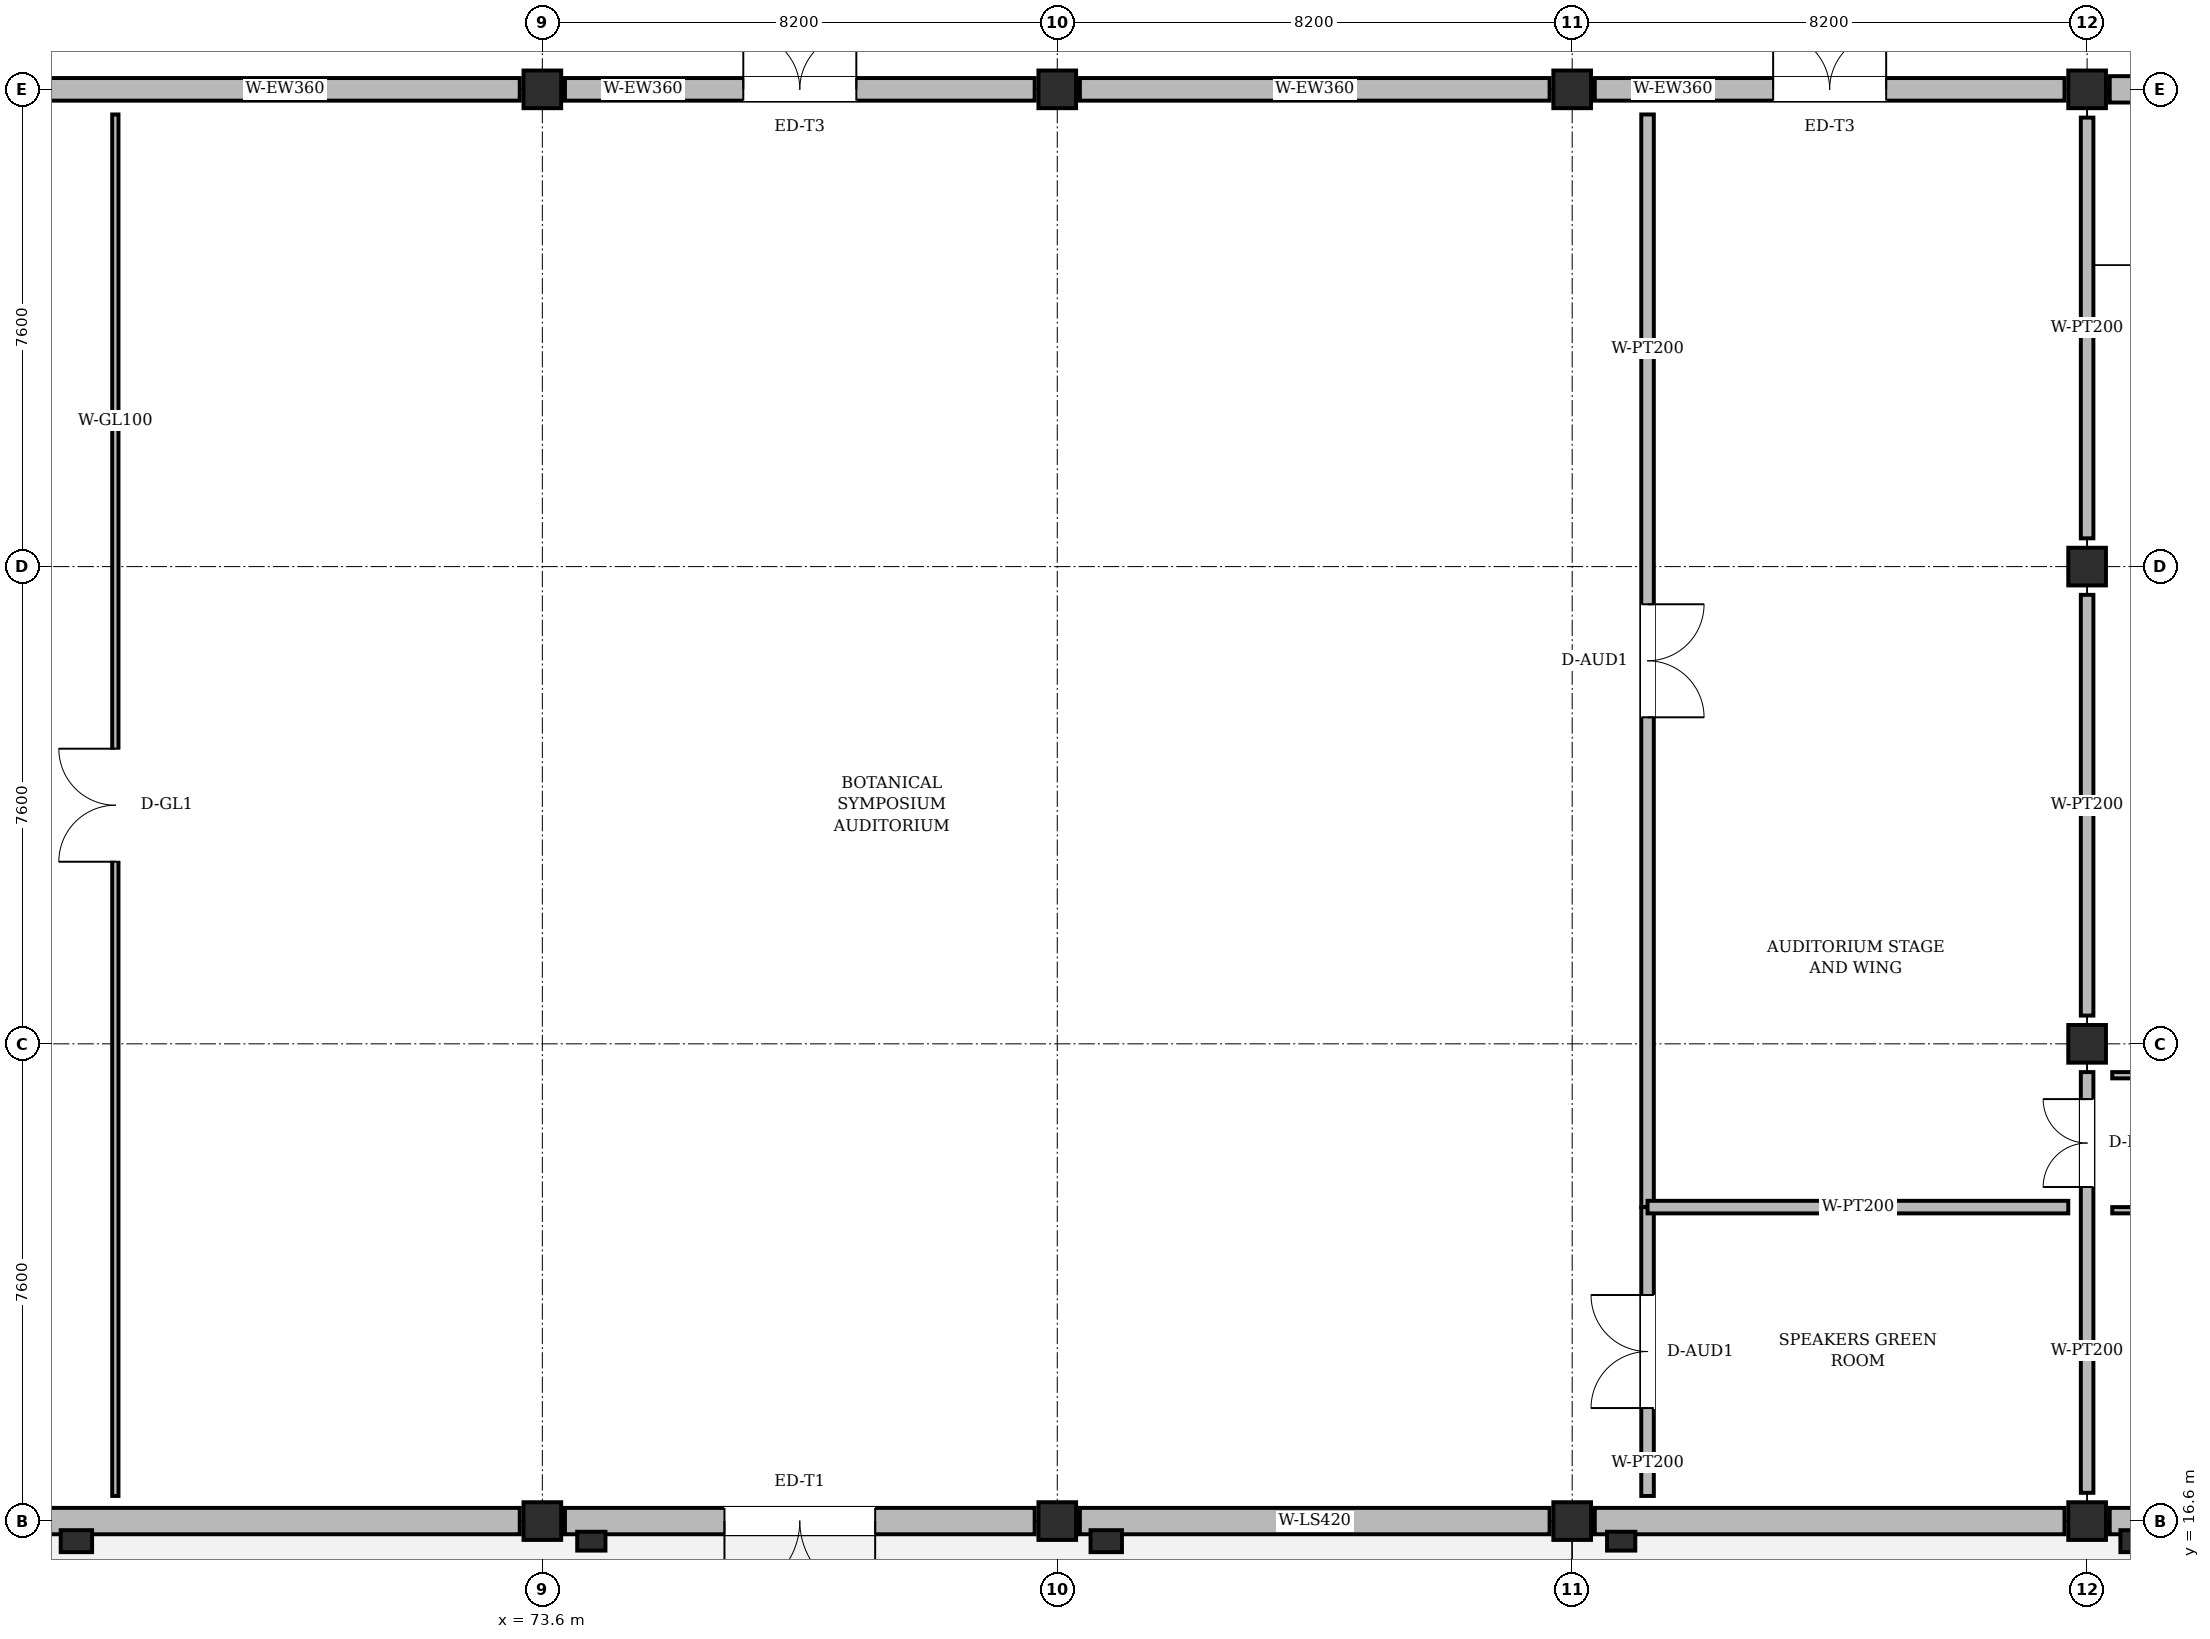
"""IFC4 building model, lengths in metres.
Left out: names, types, materials, properties, quantities, classifications, styles, units other than length and angle.
Written with IfcOpenShell. Run it as: python <this file> out.ifc"""

import sys

from ifc_helpers import new_model, si_unit, direction, frame, frame_2d, origin, origin_2d, place, context, subcontext, project, spatial, rectangle, extrude, element, fill, save


model = new_model("IFC4")
c1 = context("Model", 3, precision=1e-05, world=origin(), true_north=direction((0.0, 1.0)))
c2 = subcontext(c1, "Body", "Model", "MODEL_VIEW")
j1 = project(units=[si_unit("LENGTHUNIT", "METRE"), si_unit("PLANEANGLEUNIT", "RADIAN")], contexts=[c1])
p1 = place(None, origin())
s1 = spatial("IfcSite", under=j1, at=p1, CompositionType="ELEMENT")
p2 = place(p1, origin())
s2 = spatial("IfcBuilding", under=s1, at=p2, CompositionType="ELEMENT")
p3 = place(p2, origin())
s3 = spatial("IfcBuildingStorey", under=s2, at=p3, CompositionType="ELEMENT", Elevation=0.0)
for number, where, z_axis, x_axis in (
    (1, (73.6, 16.6, 0.0), (0.0, 0.0, 1.0), (1.0, 0.0, 0.0)),
    (2, (73.6, 39.4, 0.0), (0.0, 0.0, 1.0), (1.0, 0.0, 0.0)),
    (3, (81.8, 16.6, 0.0), (0.0, 0.0, 1.0), (1.0, 0.0, 0.0)),
    (4, (81.8, 39.4, 0.0), (0.0, 0.0, 1.0), (1.0, 0.0, 0.0)),
    (5, (90.0, 16.6, 0.0), (0.0, 0.0, 1.0), (1.0, 0.0, 0.0)),
    (6, (90.0, 39.4, 0.0), (0.0, 0.0, 1.0), (1.0, 0.0, 0.0)),
    (7, (98.2, 16.6, 0.0), (0.0, 0.0, 1.0), (1.0, 0.0, 0.0)),
    (8, (98.2, 24.2, 0.0), (0.0, 0.0, 1.0), (1.0, 0.0, 0.0)),
    (9, (98.2, 31.8, 0.0), (0.0, 0.0, 1.0), (1.0, 0.0, 0.0)),
    (10, (98.2, 39.4, 0.0), (0.0, 0.0, 1.0), (1.0, 0.0, 0.0)),
):
    element("IfcColumn", number, at=place(p3, frame(where, z_axis=z_axis, x_axis=x_axis)), inside=s3, PredefinedType="COLUMN", context=c2, shape_type="SweptSolid", body=[
        extrude(rectangle(XDim=0.6, YDim=0.6, at=origin_2d()), origin(), (0.0, 0.0, 1.0), 5.1),
    ])
p4 = place(p3, frame((66.18, 16.28, 0.0), z_axis=(0.0, 0.0, 1.0), x_axis=(1.0, 0.0, 0.0)))
e11 = element("IfcColumn", 11, at=p4, inside=s3, PredefinedType="PILASTER", context=c2, shape_type="SweptSolid", body=[
    extrude(rectangle(XDim=0.5, YDim=0.35, at=origin_2d()), origin(), (0.0, 0.0, 1.0), 5.175),
])
p5 = place(p3, frame((74.38, 16.28, 0.0), z_axis=(0.0, 0.0, 1.0), x_axis=(1.0, 0.0, 0.0)))
e12 = element("IfcColumn", 12, at=p5, inside=s3, PredefinedType="PILASTER", context=c2, shape_type="SweptSolid", body=[
    extrude(rectangle(XDim=0.45, YDim=0.3, at=origin_2d()), origin(), (0.0, 0.0, 1.0), 5.175),
])
p6 = place(p3, frame((82.58, 16.28, 0.0), z_axis=(0.0, 0.0, 1.0), x_axis=(1.0, 0.0, 0.0)))
e13 = element("IfcColumn", 13, at=p6, inside=s3, PredefinedType="PILASTER", context=c2, shape_type="SweptSolid", body=[
    extrude(rectangle(XDim=0.5, YDim=0.35, at=origin_2d()), origin(), (0.0, 0.0, 1.0), 5.175),
])
p7 = place(p3, frame((90.78, 16.28, 0.0), z_axis=(0.0, 0.0, 1.0), x_axis=(1.0, 0.0, 0.0)))
e14 = element("IfcColumn", 14, at=p7, inside=s3, PredefinedType="PILASTER", context=c2, shape_type="SweptSolid", body=[
    extrude(rectangle(XDim=0.45, YDim=0.3, at=origin_2d()), origin(), (0.0, 0.0, 1.0), 5.175),
])
p8 = place(p3, frame((98.98, 16.28, 0.0), z_axis=(0.0, 0.0, 1.0), x_axis=(1.0, 0.0, 0.0)))
e15 = element("IfcColumn", 15, at=p8, inside=s3, PredefinedType="PILASTER", context=c2, shape_type="SweptSolid", body=[
    extrude(rectangle(XDim=0.5, YDim=0.35, at=origin_2d()), origin(), (0.0, 0.0, 1.0), 5.175),
])
p9 = place(p3, frame((65.76, 16.6, 0.0), z_axis=(0.0, 0.0, 1.0), x_axis=(1.0, 0.0, 0.0)))
e16 = element("IfcWall", 16, at=p9, inside=s3, PredefinedType="SOLIDWALL", context=c2, shape_type="SweptSolid", body=[
    extrude(rectangle(XDim=7.48, YDim=0.42, at=frame_2d((3.74, 0.0))), origin(), (0.0, 0.0, 1.0), 4.335),
])
p10 = place(p3, frame((73.96, 16.6, 0.0), z_axis=(0.0, 0.0, 1.0), x_axis=(1.0, 0.0, 0.0)))
e17 = element("IfcWall", 17, at=p10, inside=s3, PredefinedType="SOLIDWALL", context=c2, shape_type="SweptSolid", body=[
    extrude(rectangle(XDim=7.48, YDim=0.42, at=frame_2d((3.74, 0.0))), origin(), (0.0, 0.0, 1.0), 4.335),
])
p11 = place(p10, frame((2.54, 0.0, 0.0)))
e18 = element("IfcOpeningElement", 18, at=p11, cuts=e17, PredefinedType="OPENING", context=c2, shape_type="SweptSolid", body=[
    extrude(rectangle(XDim=2.4, YDim=2.6, at=frame_2d((1.2, 1.3))), frame((0.0, 0.222, 0.0), z_axis=(0.0, -1.0, 0.0), x_axis=(1.0, 0.0, 0.0)), (0.0, 0.0, 1.0), 0.444),
])
for number, where, z_axis, x_axis in (
    (19, (82.16, 16.6, 0.0), (0.0, 0.0, 1.0), (1.0, 0.0, 0.0)),
    (20, (90.36, 16.6, 0.0), (0.0, 0.0, 1.0), (1.0, 0.0, 0.0)),
):
    element("IfcWall", number, at=place(p3, frame(where, z_axis=z_axis, x_axis=x_axis)), inside=s3, PredefinedType="SOLIDWALL", context=c2, shape_type="SweptSolid", body=[
        extrude(rectangle(XDim=7.48, YDim=0.42, at=frame_2d((3.74, 0.0))), origin(), (0.0, 0.0, 1.0), 4.335),
    ])
p12 = place(p3, frame((97.84, 39.4, 0.0), z_axis=(0.0, 0.0, 1.0), x_axis=(-1.0, 0.0, 0.0)))
e21 = element("IfcWall", 21, at=p12, inside=s3, PredefinedType="SOLIDWALL", context=c2, shape_type="SweptSolid", body=[
    extrude(rectangle(XDim=7.48, YDim=0.36, at=frame_2d((3.74, 0.0))), origin(), (0.0, 0.0, 1.0), 4.465),
])
p13 = place(p12, frame((2.84, 0.0, 0.0)))
e22 = element("IfcOpeningElement", 22, at=p13, cuts=e21, PredefinedType="OPENING", context=c2, shape_type="SweptSolid", body=[
    extrude(rectangle(XDim=1.8, YDim=2.2, at=frame_2d((0.9, 1.1))), frame((0.0, 0.192, 0.0), z_axis=(0.0, -1.0, 0.0), x_axis=(1.0, 0.0, 0.0)), (0.0, 0.0, 1.0), 0.384),
])
p14 = place(p3, frame((89.64, 39.4, 0.0), z_axis=(0.0, 0.0, 1.0), x_axis=(-1.0, 0.0, 0.0)))
e23 = element("IfcWall", 23, at=p14, inside=s3, PredefinedType="SOLIDWALL", context=c2, shape_type="SweptSolid", body=[
    extrude(rectangle(XDim=7.48, YDim=0.36, at=frame_2d((3.74, 0.0))), origin(), (0.0, 0.0, 1.0), 4.465),
])
p15 = place(p3, frame((81.44, 39.4, 0.0), z_axis=(0.0, 0.0, 1.0), x_axis=(-1.0, 0.0, 0.0)))
e24 = element("IfcWall", 24, at=p15, inside=s3, PredefinedType="SOLIDWALL", context=c2, shape_type="SweptSolid", body=[
    extrude(rectangle(XDim=7.48, YDim=0.36, at=frame_2d((3.74, 0.0))), origin(), (0.0, 0.0, 1.0), 4.465),
])
p16 = place(p15, frame((2.84, 0.0, 0.0)))
e25 = element("IfcOpeningElement", 25, at=p16, cuts=e24, PredefinedType="OPENING", context=c2, shape_type="SweptSolid", body=[
    extrude(rectangle(XDim=1.8, YDim=2.2, at=frame_2d((0.9, 1.1))), frame((0.0, 0.192, 0.0), z_axis=(0.0, -1.0, 0.0), x_axis=(1.0, 0.0, 0.0)), (0.0, 0.0, 1.0), 0.384),
])
p17 = place(p3, frame((73.24, 39.4, 0.0), z_axis=(0.0, 0.0, 1.0), x_axis=(-1.0, 0.0, 0.0)))
e26 = element("IfcWall", 26, at=p17, inside=s3, PredefinedType="SOLIDWALL", context=c2, shape_type="SweptSolid", body=[
    extrude(rectangle(XDim=7.48, YDim=0.36, at=frame_2d((3.74, 0.0))), origin(), (0.0, 0.0, 1.0), 4.465),
])
p18 = place(p3, frame((98.56, 16.6, 0.0), z_axis=(0.0, 0.0, 1.0), x_axis=(1.0, 0.0, 0.0)))
e27 = element("IfcWall", 27, at=p18, inside=s3, PredefinedType="SOLIDWALL", context=c2, shape_type="SweptSolid", body=[
    extrude(rectangle(XDim=7.48, YDim=0.42, at=frame_2d((3.74, 0.0))), origin(), (0.0, 0.0, 1.0), 4.335),
])
p19 = place(p18, frame((3.29, 0.0, 0.95)))
e28 = element("IfcOpeningElement", 28, at=p19, cuts=e27, PredefinedType="OPENING", context=c2, shape_type="SweptSolid", body=[
    extrude(rectangle(XDim=0.9, YDim=2.1, at=frame_2d((0.45, 1.05))), frame((0.0, 0.222, 0.0), z_axis=(0.0, -1.0, 0.0), x_axis=(1.0, 0.0, 0.0)), (0.0, 0.0, 1.0), 0.444),
])
p20 = place(p3, frame((106.04, 39.4, 0.0), z_axis=(0.0, 0.0, 1.0), x_axis=(-1.0, 0.0, 0.0)))
e29 = element("IfcWall", 29, at=p20, inside=s3, PredefinedType="SOLIDWALL", context=c2, shape_type="SweptSolid", body=[
    extrude(rectangle(XDim=7.48, YDim=0.42, at=frame_2d((3.74, 0.0))), origin(), (0.0, 0.0, 1.0), 4.485),
])
p21 = place(p20, frame((2.815, 0.0, 0.95)))
e30 = element("IfcOpeningElement", 30, at=p21, cuts=e29, PredefinedType="OPENING", context=c2, shape_type="SweptSolid", body=[
    extrude(rectangle(XDim=1.85, YDim=2.05, at=frame_2d((0.925, 1.025))), frame((0.0, 0.222, 0.0), z_axis=(0.0, -1.0, 0.0), x_axis=(1.0, 0.0, 0.0)), (0.0, 0.0, 1.0), 0.444),
])
p22 = place(p3, frame((98.2, 17.05, 0.0), z_axis=(0.0, 0.0, 1.0), x_axis=(0.0, 1.0, 0.0)))
e31 = element("IfcWall", 31, at=p22, inside=s3, PredefinedType="PARTITIONING", context=c2, shape_type="SweptSolid", body=[
    extrude(rectangle(XDim=6.7, YDim=0.2, at=frame_2d((3.35, 0.0))), origin(), (0.0, 0.0, 1.0), 4.335),
])
p23 = place(p22, frame((4.87, 0.0, 0.0)))
e32 = element("IfcOpeningElement", 32, at=p23, cuts=e31, PredefinedType="OPENING", context=c2, shape_type="SweptSolid", body=[
    extrude(rectangle(XDim=1.4, YDim=2.2, at=frame_2d((0.7, 1.1))), frame((0.0, 0.112, 0.0), z_axis=(0.0, -1.0, 0.0), x_axis=(1.0, 0.0, 0.0)), (0.0, 0.0, 1.0), 0.224),
])
p24 = place(p3, frame((98.2, 24.65, 0.0), z_axis=(0.0, 0.0, 1.0), x_axis=(0.0, 1.0, 0.0)))
e33 = element("IfcWall", 33, at=p24, inside=s3, PredefinedType="PARTITIONING", context=c2, shape_type="SweptSolid", body=[
    extrude(rectangle(XDim=6.7, YDim=0.2, at=frame_2d((3.35, 0.0))), origin(), (0.0, 0.0, 1.0), 4.335),
])
p25 = place(p3, frame((98.2, 32.25, 0.0), z_axis=(0.0, 0.0, 1.0), x_axis=(0.0, 1.0, 0.0)))
e34 = element("IfcWall", 34, at=p25, inside=s3, PredefinedType="PARTITIONING", context=c2, shape_type="SweptSolid", body=[
    extrude(rectangle(XDim=6.7, YDim=0.2, at=frame_2d((3.35, 0.0))), origin(), (0.0, 0.0, 1.0), 4.335),
])
p26 = place(p3, frame((147.95, 21.55, 0.0), z_axis=(0.0, 0.0, 1.0), x_axis=(-1.0, 0.0, 0.0)))
e35 = element("IfcWall", 35, at=p26, inside=s3, PredefinedType="PARTITIONING", context=c2, shape_type="SweptSolid", body=[
    extrude(rectangle(XDim=49.35, YDim=0.1, at=frame_2d((24.675, 0.0))), origin(), (0.0, 0.0, 1.0), 4.525),
])
p27 = place(p26, frame((23.775, 0.0, 0.0)))
e36 = element("IfcOpeningElement", 36, at=p27, cuts=e35, PredefinedType="OPENING", context=c2, shape_type="SweptSolid", body=[
    extrude(rectangle(XDim=1.8, YDim=2.4, at=frame_2d((0.9, 1.2))), frame((0.0, 0.062, 0.0), z_axis=(0.0, -1.0, 0.0), x_axis=(1.0, 0.0, 0.0)), (0.0, 0.0, 1.0), 0.124),
])
p28 = place(p3, frame((98.6, 23.7, 0.0), z_axis=(0.0, 0.0, 1.0), x_axis=(1.0, 0.0, 0.0)))
e37 = element("IfcWall", 37, at=p28, inside=s3, PredefinedType="PARTITIONING", context=c2, shape_type="SweptSolid", body=[
    extrude(rectangle(XDim=40.9, YDim=0.1, at=frame_2d((20.45, 0.0))), origin(), (0.0, 0.0, 1.0), 3.485),
])
p29 = place(p28, frame((19.55, 0.0, 0.0)))
e38 = element("IfcOpeningElement", 38, at=p29, cuts=e37, PredefinedType="OPENING", context=c2, shape_type="SweptSolid", body=[
    extrude(rectangle(XDim=1.8, YDim=2.4, at=frame_2d((0.9, 1.2))), frame((0.0, 0.062, 0.0), z_axis=(0.0, -1.0, 0.0), x_axis=(1.0, 0.0, 0.0)), (0.0, 0.0, 1.0), 0.124),
])
p30 = place(p3, frame((66.8, 39.0, 0.0), z_axis=(0.0, 0.0, 1.0), x_axis=(0.0, -1.0, 0.0)))
e39 = element("IfcWall", 39, at=p30, inside=s3, PredefinedType="PARTITIONING", context=c2, shape_type="SweptSolid", body=[
    extrude(rectangle(XDim=22.0, YDim=0.1, at=frame_2d((11.0, 0.0))), origin(), (0.0, 0.0, 1.0), 5.005),
])
p31 = place(p30, frame((10.1, 0.0, 0.0)))
e40 = element("IfcOpeningElement", 40, at=p31, cuts=e39, PredefinedType="OPENING", context=c2, shape_type="SweptSolid", body=[
    extrude(rectangle(XDim=1.8, YDim=2.4, at=frame_2d((0.9, 1.2))), frame((0.0, 0.062, 0.0), z_axis=(0.0, -1.0, 0.0), x_axis=(1.0, 0.0, 0.0)), (0.0, 0.0, 1.0), 0.124),
])
p32 = place(p3, frame((91.2, 39.0, 0.0), z_axis=(0.0, 0.0, 1.0), x_axis=(0.0, -1.0, 0.0)))
e41 = element("IfcWall", 41, at=p32, inside=s3, PredefinedType="PARTITIONING", context=c2, shape_type="SweptSolid", body=[
    extrude(rectangle(XDim=17.4, YDim=0.2, at=frame_2d((8.7, 0.0))), origin(), (0.0, 0.0, 1.0), 5.005),
])
p33 = place(p32, frame((7.8, 0.0, 0.0)))
e42 = element("IfcOpeningElement", 42, at=p33, cuts=e41, PredefinedType="OPENING", context=c2, shape_type="SweptSolid", body=[
    extrude(rectangle(XDim=1.8, YDim=2.4, at=frame_2d((0.9, 1.2))), frame((0.0, 0.112, 0.0), z_axis=(0.0, -1.0, 0.0), x_axis=(1.0, 0.0, 0.0)), (0.0, 0.0, 1.0), 0.224),
])
p34 = place(p3, frame((91.2, 21.6, 0.0), z_axis=(0.0, 0.0, 1.0), x_axis=(0.0, -1.0, 0.0)))
e43 = element("IfcWall", 43, at=p34, inside=s3, PredefinedType="PARTITIONING", context=c2, shape_type="SweptSolid", body=[
    extrude(rectangle(XDim=4.6, YDim=0.2, at=frame_2d((2.3, 0.0))), origin(), (0.0, 0.0, 1.0), 5.005),
])
p35 = place(p34, frame((1.4, 0.0, 0.0)))
e44 = element("IfcOpeningElement", 44, at=p35, cuts=e43, PredefinedType="OPENING", context=c2, shape_type="SweptSolid", body=[
    extrude(rectangle(XDim=1.8, YDim=2.4, at=frame_2d((0.9, 1.2))), frame((0.0, 0.112, 0.0), z_axis=(0.0, -1.0, 0.0), x_axis=(1.0, 0.0, 0.0)), (0.0, 0.0, 1.0), 0.224),
])
p36 = place(p3, frame((97.9, 21.6, 0.0), z_axis=(0.0, 0.0, 1.0), x_axis=(-1.0, 0.0, 0.0)))
e45 = element("IfcWall", 45, at=p36, inside=s3, PredefinedType="PARTITIONING", context=c2, shape_type="SweptSolid", body=[
    extrude(rectangle(XDim=6.7, YDim=0.2, at=frame_2d((3.35, 0.0))), origin(), (0.0, 0.0, 1.0), 5.005),
])
p37 = place(p11, frame((2.4, 0.0, 0.0), z_axis=(0.0, 0.0, 1.0), x_axis=(-1.0, 0.0, 0.0)))
e46 = element("IfcDoor", 46, at=p37, inside=s3, OperationType="DOUBLE_DOOR_SINGLE_SWING", PredefinedType="DOOR", context=c2, shape_type="SweptSolid", body=[
    extrude(rectangle(XDim=2.4, YDim=2.6, at=frame_2d((1.2, 1.3))), frame((0.0, 0.025, 0.0), z_axis=(0.0, -1.0, 0.0), x_axis=(1.0, 0.0, 0.0)), (0.0, 0.0, 1.0), 0.05),
])
fill(e18, e46)
p38 = place(p13, frame((1.8, 0.0, 0.0), z_axis=(0.0, 0.0, 1.0), x_axis=(-1.0, 0.0, 0.0)))
e47 = element("IfcDoor", 47, at=p38, inside=s3, OperationType="DOUBLE_DOOR_SINGLE_SWING", PredefinedType="DOOR", context=c2, shape_type="SweptSolid", body=[
    extrude(rectangle(XDim=1.8, YDim=2.2, at=frame_2d((0.9, 1.1))), frame((0.0, 0.025, 0.0), z_axis=(0.0, -1.0, 0.0), x_axis=(1.0, 0.0, 0.0)), (0.0, 0.0, 1.0), 0.05),
])
fill(e22, e47)
p39 = place(p16, frame((1.8, 0.0, 0.0), z_axis=(0.0, 0.0, 1.0), x_axis=(-1.0, 0.0, 0.0)))
e48 = element("IfcDoor", 48, at=p39, inside=s3, OperationType="DOUBLE_DOOR_SINGLE_SWING", PredefinedType="DOOR", context=c2, shape_type="SweptSolid", body=[
    extrude(rectangle(XDim=1.8, YDim=2.2, at=frame_2d((0.9, 1.1))), frame((0.0, 0.025, 0.0), z_axis=(0.0, -1.0, 0.0), x_axis=(1.0, 0.0, 0.0)), (0.0, 0.0, 1.0), 0.05),
])
fill(e25, e48)
p40 = place(p23, origin())
e49 = element("IfcDoor", 49, at=p40, inside=s3, OperationType="DOUBLE_DOOR_SINGLE_SWING", PredefinedType="DOOR", context=c2, shape_type="SweptSolid", body=[
    extrude(rectangle(XDim=1.4, YDim=2.2, at=frame_2d((0.7, 1.1))), frame((0.0, 0.025, 0.0), z_axis=(0.0, -1.0, 0.0), x_axis=(1.0, 0.0, 0.0)), (0.0, 0.0, 1.0), 0.05),
])
fill(e32, e49)
p41 = place(p31, frame((1.8, 0.0, 0.0), z_axis=(0.0, 0.0, 1.0), x_axis=(-1.0, 0.0, 0.0)))
e50 = element("IfcDoor", 50, at=p41, inside=s3, OperationType="DOUBLE_DOOR_SINGLE_SWING", PredefinedType="DOOR", context=c2, shape_type="SweptSolid", body=[
    extrude(rectangle(XDim=1.8, YDim=2.4, at=frame_2d((0.9, 1.2))), frame((0.0, 0.025, 0.0), z_axis=(0.0, -1.0, 0.0), x_axis=(1.0, 0.0, 0.0)), (0.0, 0.0, 1.0), 0.05),
])
fill(e40, e50)
p42 = place(p33, origin())
e51 = element("IfcDoor", 51, at=p42, inside=s3, OperationType="DOUBLE_DOOR_SINGLE_SWING", PredefinedType="DOOR", context=c2, shape_type="SweptSolid", body=[
    extrude(rectangle(XDim=1.8, YDim=2.4, at=frame_2d((0.9, 1.2))), frame((0.0, 0.025, 0.0), z_axis=(0.0, -1.0, 0.0), x_axis=(1.0, 0.0, 0.0)), (0.0, 0.0, 1.0), 0.05),
])
fill(e42, e51)
p43 = place(p35, frame((1.8, 0.0, 0.0), z_axis=(0.0, 0.0, 1.0), x_axis=(-1.0, 0.0, 0.0)))
e52 = element("IfcDoor", 52, at=p43, inside=s3, OperationType="DOUBLE_DOOR_SINGLE_SWING", PredefinedType="DOOR", context=c2, shape_type="SweptSolid", body=[
    extrude(rectangle(XDim=1.8, YDim=2.4, at=frame_2d((0.9, 1.2))), frame((0.0, 0.025, 0.0), z_axis=(0.0, -1.0, 0.0), x_axis=(1.0, 0.0, 0.0)), (0.0, 0.0, 1.0), 0.05),
])
fill(e44, e52)
save(model, sys.argv[1])
